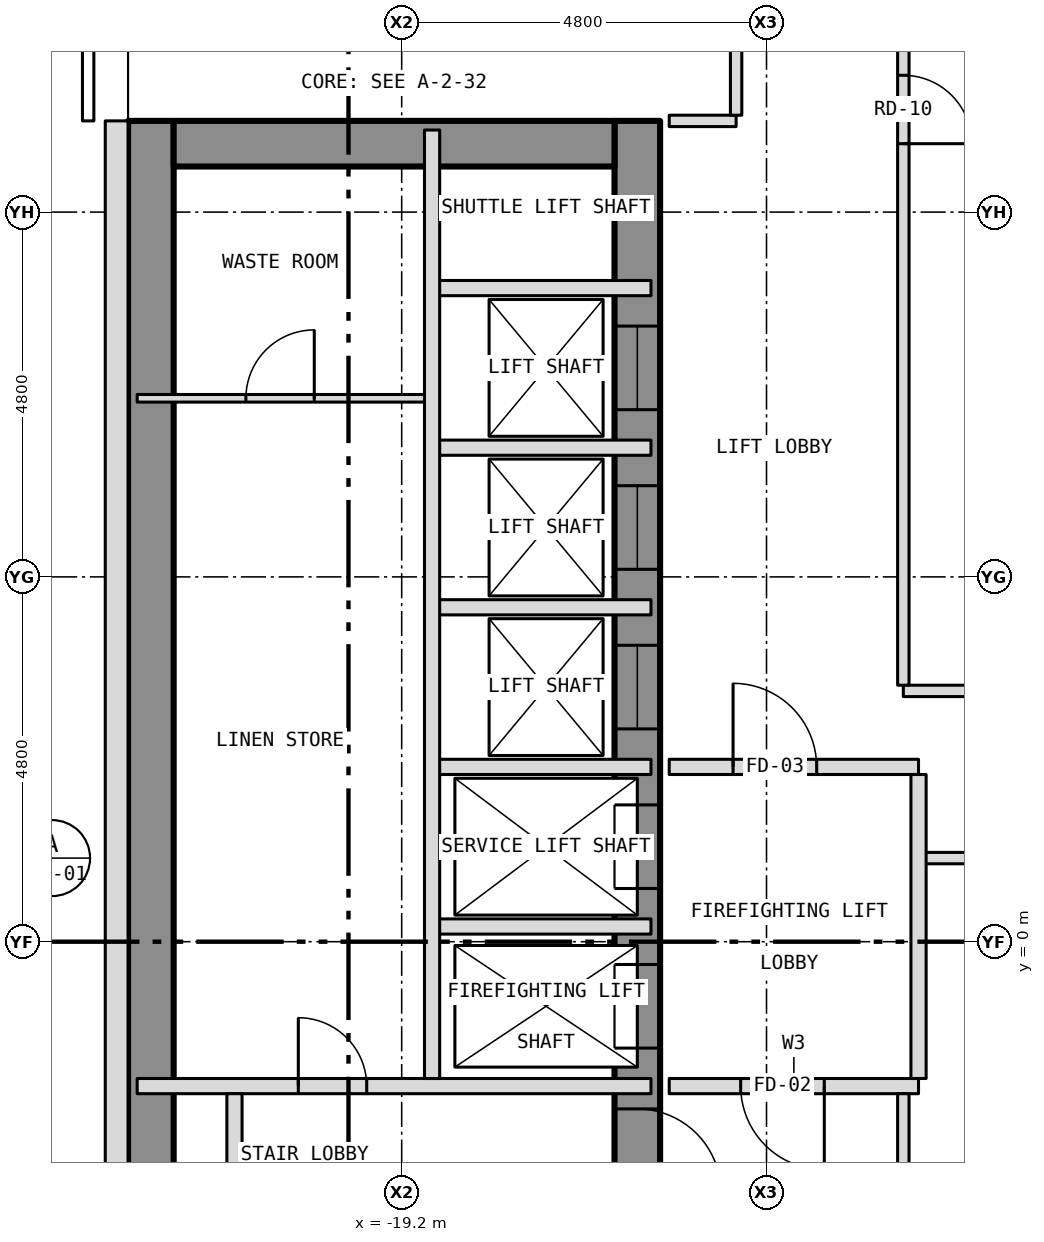
"""IFC4 building model, lengths in metres.
Left out: names, types, materials, properties, quantities, classifications, styles, units other than length and angle.
Written with IfcOpenShell. Run it as: python <this file> out.ifc"""

import sys

from ifc_helpers import new_model, si_unit, direction, frame, frame_2d, origin, place, context, subcontext, project, spatial, rectangle, extrude, element, fill, save


model = new_model("IFC4")
c1 = context("Model", 3, precision=1e-05, world=origin(), true_north=direction((0.0, 1.0)))
c2 = subcontext(c1, "Body", "Model", "MODEL_VIEW")
j1 = project(units=[si_unit("LENGTHUNIT", "METRE"), si_unit("PLANEANGLEUNIT", "RADIAN")], contexts=[c1])
p1 = place(None, origin())
s1 = spatial("IfcSite", under=j1, at=p1, CompositionType="ELEMENT")
p2 = place(p1, origin())
s2 = spatial("IfcBuilding", under=s1, at=p2, CompositionType="ELEMENT")
p3 = place(p2, frame((0.0, 0.0, 117.0)))
s3 = spatial("IfcBuildingStorey", under=s2, at=p3, CompositionType="ELEMENT", Elevation=117.0)
p4 = place(p3, frame((-16.1, -10.8, 0.0), z_axis=(0.0, 0.0, 1.0), x_axis=(0.0, 1.0, 0.0)))
e1 = element("IfcWall", 1, at=p4, inside=s3, PredefinedType="SHEAR", context=c2, shape_type="SweptSolid", body=[
    extrude(rectangle(XDim=21.6, YDim=0.6, at=frame_2d((10.8, 0.0))), origin(), (0.0, 0.0, 1.0), 3.25),
])
p5 = place(p4, frame((9.4, 0.0, 0.0)))
e2 = element("IfcOpeningElement", 2, at=p5, cuts=e1, PredefinedType="OPENING", context=c2, shape_type="SweptSolid", body=[
    extrude(rectangle(XDim=1.1, YDim=2.1, at=frame_2d((0.55, 1.05))), frame((0.0, 0.312, 0.0), z_axis=(0.0, -1.0, 0.0), x_axis=(1.0, 0.0, 0.0)), (0.0, 0.0, 1.0), 0.624),
])
p6 = place(p4, frame((11.5, 0.0, 0.0)))
e3 = element("IfcOpeningElement", 3, at=p6, cuts=e1, PredefinedType="OPENING", context=c2, shape_type="SweptSolid", body=[
    extrude(rectangle(XDim=1.1, YDim=2.1, at=frame_2d((0.55, 1.05))), frame((0.0, 0.312, 0.0), z_axis=(0.0, -1.0, 0.0), x_axis=(1.0, 0.0, 0.0)), (0.0, 0.0, 1.0), 0.624),
])
p7 = place(p4, frame((13.6, 0.0, 0.0)))
e4 = element("IfcOpeningElement", 4, at=p7, cuts=e1, PredefinedType="OPENING", context=c2, shape_type="SweptSolid", body=[
    extrude(rectangle(XDim=1.1, YDim=2.1, at=frame_2d((0.55, 1.05))), frame((0.0, 0.312, 0.0), z_axis=(0.0, -1.0, 0.0), x_axis=(1.0, 0.0, 0.0)), (0.0, 0.0, 1.0), 0.624),
])
p8 = place(p4, frame((15.7, 0.0, 0.0)))
e5 = element("IfcOpeningElement", 5, at=p8, cuts=e1, PredefinedType="OPENING", context=c2, shape_type="SweptSolid", body=[
    extrude(rectangle(XDim=1.1, YDim=2.1, at=frame_2d((0.55, 1.05))), frame((0.0, 0.312, 0.0), z_axis=(0.0, -1.0, 0.0), x_axis=(1.0, 0.0, 0.0)), (0.0, 0.0, 1.0), 0.624),
])
p9 = place(p4, frame((17.8, 0.0, 0.0)))
e6 = element("IfcOpeningElement", 6, at=p9, cuts=e1, PredefinedType="OPENING", context=c2, shape_type="SweptSolid", body=[
    extrude(rectangle(XDim=1.1, YDim=2.1, at=frame_2d((0.55, 1.05))), frame((0.0, 0.312, 0.0), z_axis=(0.0, -1.0, 0.0), x_axis=(1.0, 0.0, 0.0)), (0.0, 0.0, 1.0), 0.624),
])
p10 = place(p4, frame((0.758, 0.0, 0.0)))
e7 = element("IfcOpeningElement", 7, at=p10, cuts=e1, PredefinedType="OPENING", context=c2, shape_type="SweptSolid", body=[
    extrude(rectangle(XDim=1.1, YDim=2.1, at=frame_2d((0.55, 1.05))), frame((0.0, 0.312, 0.0), z_axis=(0.0, -1.0, 0.0), x_axis=(1.0, 0.0, 0.0)), (0.0, 0.0, 1.0), 0.624),
])
p11 = place(p4, frame((7.5, 0.0, 0.0)))
e8 = element("IfcOpeningElement", 8, at=p11, cuts=e1, PredefinedType="OPENING", context=c2, shape_type="SweptSolid", body=[
    extrude(rectangle(XDim=1.1, YDim=2.1, at=frame_2d((0.55, 1.05))), frame((0.0, 0.312, 0.0), z_axis=(0.0, -1.0, 0.0), x_axis=(1.0, 0.0, 0.0)), (0.0, 0.0, 1.0), 0.624),
])
p12 = place(p3, frame((-22.5, -10.8, 0.0), z_axis=(0.0, 0.0, 1.0), x_axis=(0.0, 1.0, 0.0)))
e9 = element("IfcWall", 9, at=p12, inside=s3, PredefinedType="SHEAR", context=c2, shape_type="SweptSolid", body=[
    extrude(rectangle(XDim=21.6, YDim=0.6, at=frame_2d((10.8, 0.0))), origin(), (0.0, 0.0, 1.0), 3.25),
])
p13 = place(p3, frame((-22.2, 10.5, 0.0), z_axis=(0.0, 0.0, 1.0), x_axis=(1.0, 0.0, 0.0)))
e10 = element("IfcWall", 10, at=p13, inside=s3, PredefinedType="SHEAR", context=c2, shape_type="SweptSolid", body=[
    extrude(rectangle(XDim=5.8, YDim=0.6, at=frame_2d((2.9, 0.0))), origin(), (0.0, 0.0, 1.0), 3.25),
])
p14 = place(p3, frame((-22.95, 10.8, 0.0), z_axis=(0.0, 0.0, 1.0), x_axis=(0.0, -1.0, 0.0)))
e11 = element("IfcWall", 11, at=p14, inside=s3, PredefinedType="SOLIDWALL", context=c2, shape_type="SweptSolid", body=[
    extrude(rectangle(XDim=21.6, YDim=0.3, at=frame_2d((10.8, 0.0))), origin(), (0.0, 0.0, 1.0), 3.5),
])
p15 = place(p14, frame((18.05, 0.0, 1.0)))
e12 = element("IfcOpeningElement", 12, at=p15, cuts=e11, PredefinedType="OPENING", context=c2, shape_type="SweptSolid", body=[
    extrude(rectangle(XDim=0.6, YDim=1.5, at=frame_2d((0.3, 0.75))), frame((0.0, 0.162, 0.0), z_axis=(0.0, -1.0, 0.0), x_axis=(1.0, 0.0, 0.0)), (0.0, 0.0, 1.0), 0.324),
])
p16 = place(p3, frame((-22.68, -1.9, 0.0), z_axis=(0.0, 0.0, 1.0), x_axis=(1.0, 0.0, 0.0)))
e13 = element("IfcWall", 13, at=p16, inside=s3, PredefinedType="PARTITIONING", context=c2, shape_type="SweptSolid", body=[
    extrude(rectangle(XDim=6.76, YDim=0.2, at=frame_2d((3.38, 0.0))), origin(), (0.0, 0.0, 1.0), 3.25),
])
p17 = place(p16, frame((2.12, 0.0, 0.0)))
e14 = element("IfcOpeningElement", 14, at=p17, cuts=e13, PredefinedType="OPENING", context=c2, shape_type="SweptSolid", body=[
    extrude(rectangle(XDim=0.9, YDim=2.1, at=frame_2d((0.45, 1.05))), frame((0.0, 0.112, 0.0), z_axis=(0.0, -1.0, 0.0), x_axis=(1.0, 0.0, 0.0)), (0.0, 0.0, 1.0), 0.224),
])
p18 = place(p3, frame((-15.68, -1.9, 0.0), z_axis=(0.0, 0.0, 1.0), x_axis=(1.0, 0.0, 0.0)))
e15 = element("IfcWall", 15, at=p18, inside=s3, PredefinedType="PARTITIONING", context=c2, shape_type="SweptSolid", body=[
    extrude(rectangle(XDim=3.28, YDim=0.2, at=frame_2d((1.64, 0.0))), origin(), (0.0, 0.0, 1.0), 3.35),
])
p19 = place(p18, frame((0.94, 0.0, 0.0)))
e16 = element("IfcOpeningElement", 16, at=p19, cuts=e15, PredefinedType="OPENING", context=c2, shape_type="SweptSolid", body=[
    extrude(rectangle(XDim=1.1, YDim=2.1, at=frame_2d((0.55, 1.05))), frame((0.0, 0.112, 0.0), z_axis=(0.0, -1.0, 0.0), x_axis=(1.0, 0.0, 0.0)), (0.0, 0.0, 1.0), 0.224),
])
p20 = place(p3, frame((-18.8, 0.2, 0.0), z_axis=(0.0, 0.0, 1.0), x_axis=(1.0, 0.0, 0.0)))
e17 = element("IfcWall", 17, at=p20, inside=s3, PredefinedType="PARTITIONING", context=c2, shape_type="SweptSolid", body=[
    extrude(rectangle(XDim=2.88, YDim=0.2, at=frame_2d((1.44, 0.0))), origin(), (0.0, 0.0, 1.0), 3.25),
])
p21 = place(p3, frame((-12.4, 1.1, 0.0), z_axis=(0.0, 0.0, 1.0), x_axis=(1.0, 0.0, 0.0)))
e18 = element("IfcWall", 18, at=p21, inside=s3, PredefinedType="PARTITIONING", context=c2, shape_type="SweptSolid", body=[
    extrude(rectangle(XDim=2.964, YDim=0.15, at=frame_2d((1.482, 0.0))), origin(), (0.0, 0.0, 1.0), 3.35),
])
p22 = place(p3, frame((-18.8, 2.3, 0.0), z_axis=(0.0, 0.0, 1.0), x_axis=(1.0, 0.0, 0.0)))
e19 = element("IfcWall", 19, at=p22, inside=s3, PredefinedType="PARTITIONING", context=c2, shape_type="SweptSolid", body=[
    extrude(rectangle(XDim=2.88, YDim=0.2, at=frame_2d((1.44, 0.0))), origin(), (0.0, 0.0, 1.0), 3.25),
])
p23 = place(p3, frame((-15.68, 2.3, 0.0), z_axis=(0.0, 0.0, 1.0), x_axis=(1.0, 0.0, 0.0)))
e20 = element("IfcWall", 20, at=p23, inside=s3, PredefinedType="PARTITIONING", context=c2, shape_type="SweptSolid", body=[
    extrude(rectangle(XDim=3.28, YDim=0.2, at=frame_2d((1.64, 0.0))), origin(), (0.0, 0.0, 1.0), 3.35),
])
p24 = place(p23, frame((0.84, 0.0, 0.0)))
e21 = element("IfcOpeningElement", 21, at=p24, cuts=e20, PredefinedType="OPENING", context=c2, shape_type="SweptSolid", body=[
    extrude(rectangle(XDim=1.1, YDim=2.1, at=frame_2d((0.55, 1.05))), frame((0.0, 0.112, 0.0), z_axis=(0.0, -1.0, 0.0), x_axis=(1.0, 0.0, 0.0)), (0.0, 0.0, 1.0), 0.224),
])
p25 = place(p3, frame((-12.6, 3.3, 0.0), z_axis=(0.0, 0.0, 1.0), x_axis=(1.0, 0.0, 0.0)))
e22 = element("IfcWall", 22, at=p25, inside=s3, PredefinedType="PARTITIONING", context=c2, shape_type="SweptSolid", body=[
    extrude(rectangle(XDim=4.68, YDim=0.15, at=frame_2d((2.34, 0.0))), origin(), (0.0, 0.0, 1.0), 3.35),
])
for number, where, z_axis, x_axis in (
    (23, (-18.8, 4.4, 0.0), (0.0, 0.0, 1.0), (1.0, 0.0, 0.0)),
    (24, (-18.8, 6.5, 0.0), (0.0, 0.0, 1.0), (1.0, 0.0, 0.0)),
):
    element("IfcWall", number, at=place(p3, frame(where, z_axis=z_axis, x_axis=x_axis)), inside=s3, PredefinedType="PARTITIONING", context=c2, shape_type="SweptSolid", body=[
        extrude(rectangle(XDim=2.88, YDim=0.2, at=frame_2d((1.44, 0.0))), origin(), (0.0, 0.0, 1.0), 3.25),
    ])
p26 = place(p3, frame((-22.68, 7.15, 0.0), z_axis=(0.0, 0.0, 1.0), x_axis=(1.0, 0.0, 0.0)))
e25 = element("IfcWall", 25, at=p26, inside=s3, PredefinedType="PARTITIONING", context=c2, shape_type="SweptSolid", body=[
    extrude(rectangle(XDim=3.88, YDim=0.1, at=frame_2d((1.94, 0.0))), origin(), (0.0, 0.0, 1.0), 3.25),
])
p27 = place(p26, frame((1.43, 0.0, 0.0)))
e26 = element("IfcOpeningElement", 26, at=p27, cuts=e25, PredefinedType="OPENING", context=c2, shape_type="SweptSolid", body=[
    extrude(rectangle(XDim=0.9, YDim=2.1, at=frame_2d((0.45, 1.05))), frame((0.0, 0.062, 0.0), z_axis=(0.0, -1.0, 0.0), x_axis=(1.0, 0.0, 0.0)), (0.0, 0.0, 1.0), 0.124),
])
p28 = place(p3, frame((-18.8, 8.6, 0.0), z_axis=(0.0, 0.0, 1.0), x_axis=(1.0, 0.0, 0.0)))
e27 = element("IfcWall", 27, at=p28, inside=s3, PredefinedType="PARTITIONING", context=c2, shape_type="SweptSolid", body=[
    extrude(rectangle(XDim=2.88, YDim=0.2, at=frame_2d((1.44, 0.0))), origin(), (0.0, 0.0, 1.0), 3.25),
])
p29 = place(p3, frame((-15.68, 10.8, 0.0), z_axis=(0.0, 0.0, 1.0), x_axis=(1.0, 0.0, 0.0)))
e28 = element("IfcWall", 28, at=p29, inside=s3, PredefinedType="PARTITIONING", context=c2, shape_type="SweptSolid", body=[
    extrude(rectangle(XDim=0.88, YDim=0.15, at=frame_2d((0.44, 0.0))), origin(), (0.0, 0.0, 1.0), 3.35),
])
p30 = place(p3, frame((-21.4, -10.68, 0.0), z_axis=(0.0, 0.0, 1.0), x_axis=(0.0, 1.0, 0.0)))
e29 = element("IfcWall", 29, at=p30, inside=s3, PredefinedType="PARTITIONING", context=c2, shape_type="SweptSolid", body=[
    extrude(rectangle(XDim=8.68, YDim=0.2, at=frame_2d((4.34, 0.0))), origin(), (0.0, 0.0, 1.0), 3.25),
])
p31 = place(p30, frame((1.21, 0.0, 0.0)))
e30 = element("IfcOpeningElement", 30, at=p31, cuts=e29, PredefinedType="OPENING", context=c2, shape_type="SweptSolid", body=[
    extrude(rectangle(XDim=0.9, YDim=2.1, at=frame_2d((0.45, 1.05))), frame((0.0, 0.112, 0.0), z_axis=(0.0, -1.0, 0.0), x_axis=(1.0, 0.0, 0.0)), (0.0, 0.0, 1.0), 0.224),
])
p32 = place(p30, frame((5.66, 0.0, 0.0)))
e31 = element("IfcOpeningElement", 31, at=p32, cuts=e29, PredefinedType="OPENING", context=c2, shape_type="SweptSolid", body=[
    extrude(rectangle(XDim=0.9, YDim=2.1, at=frame_2d((0.45, 1.05))), frame((0.0, 0.112, 0.0), z_axis=(0.0, -1.0, 0.0), x_axis=(1.0, 0.0, 0.0)), (0.0, 0.0, 1.0), 0.224),
])
p33 = place(p3, frame((-18.8, -1.8, 0.0), z_axis=(0.0, 0.0, 1.0), x_axis=(0.0, 1.0, 0.0)))
e32 = element("IfcWall", 32, at=p33, inside=s3, PredefinedType="PARTITIONING", context=c2, shape_type="SweptSolid", body=[
    extrude(rectangle(XDim=12.48, YDim=0.2, at=frame_2d((6.24, 0.0))), origin(), (0.0, 0.0, 1.0), 3.25),
])
p34 = place(p3, frame((-14.8, 10.875, 0.0), z_axis=(0.0, 0.0, 1.0), x_axis=(0.0, 1.0, 0.0)))
e33 = element("IfcWall", 33, at=p34, inside=s3, PredefinedType="PARTITIONING", context=c2, shape_type="SweptSolid", body=[
    extrude(rectangle(XDim=3.85, YDim=0.15, at=frame_2d((1.925, 0.0))), origin(), (0.0, 0.0, 1.0), 3.35),
])
p35 = place(p34, frame((2.325, 0.0, 0.0)))
e34 = element("IfcOpeningElement", 34, at=p35, cuts=e33, PredefinedType="OPENING", context=c2, shape_type="SweptSolid", body=[
    extrude(rectangle(XDim=1.0, YDim=2.1, at=frame_2d((0.5, 1.05))), frame((0.0, 0.087, 0.0), z_axis=(0.0, -1.0, 0.0), x_axis=(1.0, 0.0, 0.0)), (0.0, 0.0, 1.0), 0.174),
])
p36 = place(p3, frame((-12.6, -12.525, 0.0), z_axis=(0.0, 0.0, 1.0), x_axis=(0.0, 1.0, 0.0)))
e35 = element("IfcWall", 35, at=p36, inside=s3, PredefinedType="PARTITIONING", context=c2, shape_type="SweptSolid", body=[
    extrude(rectangle(XDim=10.525, YDim=0.15, at=frame_2d((5.262, 0.0))), origin(), (0.0, 0.0, 1.0), 3.35),
])
p37 = place(p36, frame((4.825, 0.0, 0.0)))
e36 = element("IfcOpeningElement", 36, at=p37, cuts=e35, PredefinedType="OPENING", context=c2, shape_type="SweptSolid", body=[
    extrude(rectangle(XDim=0.9, YDim=2.1, at=frame_2d((0.45, 1.05))), frame((0.0, 0.087, 0.0), z_axis=(0.0, -1.0, 0.0), x_axis=(1.0, 0.0, 0.0)), (0.0, 0.0, 1.0), 0.174),
])
p38 = place(p3, frame((-12.6, 3.375, 0.0), z_axis=(0.0, 0.0, 1.0), x_axis=(0.0, 1.0, 0.0)))
e37 = element("IfcWall", 37, at=p38, inside=s3, PredefinedType="PARTITIONING", context=c2, shape_type="SweptSolid", body=[
    extrude(rectangle(XDim=9.15, YDim=0.15, at=frame_2d((4.575, 0.0))), origin(), (0.0, 0.0, 1.0), 3.35),
])
p39 = place(p38, frame((7.125, 0.0, 0.0)))
e38 = element("IfcOpeningElement", 38, at=p39, cuts=e37, PredefinedType="OPENING", context=c2, shape_type="SweptSolid", body=[
    extrude(rectangle(XDim=0.9, YDim=2.1, at=frame_2d((0.45, 1.05))), frame((0.0, 0.087, 0.0), z_axis=(0.0, -1.0, 0.0), x_axis=(1.0, 0.0, 0.0)), (0.0, 0.0, 1.0), 0.174),
])
p40 = place(p3, frame((-12.4, -1.8, 0.0), z_axis=(0.0, 0.0, 1.0), x_axis=(0.0, 1.0, 0.0)))
e39 = element("IfcWall", 39, at=p40, inside=s3, PredefinedType="PARTITIONING", context=c2, shape_type="SweptSolid", body=[
    extrude(rectangle(XDim=4.0, YDim=0.2, at=frame_2d((2.0, 0.0))), origin(), (0.0, 0.0, 1.0), 3.35),
])
p41 = place(p5, origin())
e40 = element("IfcDoor", 40, at=p41, inside=s3, OperationType="SLIDING_TO_LEFT", PredefinedType="DOOR", context=c2, shape_type="SweptSolid", body=[
    extrude(rectangle(XDim=1.1, YDim=2.1, at=frame_2d((0.55, 1.05))), frame((0.0, 0.025, 0.0), z_axis=(0.0, -1.0, 0.0), x_axis=(1.0, 0.0, 0.0)), (0.0, 0.0, 1.0), 0.05),
])
fill(e2, e40)
p42 = place(p6, origin())
e41 = element("IfcDoor", 41, at=p42, inside=s3, OperationType="SLIDING_TO_LEFT", PredefinedType="DOOR", context=c2, shape_type="SweptSolid", body=[
    extrude(rectangle(XDim=1.1, YDim=2.1, at=frame_2d((0.55, 1.05))), frame((0.0, 0.025, 0.0), z_axis=(0.0, -1.0, 0.0), x_axis=(1.0, 0.0, 0.0)), (0.0, 0.0, 1.0), 0.05),
])
fill(e3, e41)
p43 = place(p7, origin())
e42 = element("IfcDoor", 42, at=p43, inside=s3, OperationType="SLIDING_TO_LEFT", PredefinedType="DOOR", context=c2, shape_type="SweptSolid", body=[
    extrude(rectangle(XDim=1.1, YDim=2.1, at=frame_2d((0.55, 1.05))), frame((0.0, 0.025, 0.0), z_axis=(0.0, -1.0, 0.0), x_axis=(1.0, 0.0, 0.0)), (0.0, 0.0, 1.0), 0.05),
])
fill(e4, e42)
p44 = place(p8, origin())
e43 = element("IfcDoor", 43, at=p44, inside=s3, OperationType="SLIDING_TO_LEFT", PredefinedType="DOOR", context=c2, shape_type="SweptSolid", body=[
    extrude(rectangle(XDim=1.1, YDim=2.1, at=frame_2d((0.55, 1.05))), frame((0.0, 0.025, 0.0), z_axis=(0.0, -1.0, 0.0), x_axis=(1.0, 0.0, 0.0)), (0.0, 0.0, 1.0), 0.05),
])
fill(e5, e43)
p45 = place(p9, origin())
e44 = element("IfcDoor", 44, at=p45, inside=s3, OperationType="SLIDING_TO_LEFT", PredefinedType="DOOR", context=c2, shape_type="SweptSolid", body=[
    extrude(rectangle(XDim=1.1, YDim=2.1, at=frame_2d((0.55, 1.05))), frame((0.0, 0.025, 0.0), z_axis=(0.0, -1.0, 0.0), x_axis=(1.0, 0.0, 0.0)), (0.0, 0.0, 1.0), 0.05),
])
fill(e6, e44)
p46 = place(p11, origin())
e45 = element("IfcDoor", 45, at=p46, inside=s3, OperationType="SINGLE_SWING_LEFT", PredefinedType="DOOR", context=c2, shape_type="SweptSolid", body=[
    extrude(rectangle(XDim=1.1, YDim=2.1, at=frame_2d((0.55, 1.05))), frame((0.0, 0.025, 0.0), z_axis=(0.0, -1.0, 0.0), x_axis=(1.0, 0.0, 0.0)), (0.0, 0.0, 1.0), 0.05),
])
fill(e8, e45)
p47 = place(p17, origin())
e46 = element("IfcDoor", 46, at=p47, inside=s3, OperationType="SINGLE_SWING_LEFT", PredefinedType="DOOR", context=c2, shape_type="SweptSolid", body=[
    extrude(rectangle(XDim=0.9, YDim=2.1, at=frame_2d((0.45, 1.05))), frame((0.0, 0.025, 0.0), z_axis=(0.0, -1.0, 0.0), x_axis=(1.0, 0.0, 0.0)), (0.0, 0.0, 1.0), 0.05),
])
fill(e14, e46)
p48 = place(p27, origin())
e47 = element("IfcDoor", 47, at=p48, inside=s3, OperationType="SINGLE_SWING_RIGHT", PredefinedType="DOOR", context=c2, shape_type="SweptSolid", body=[
    extrude(rectangle(XDim=0.9, YDim=2.1, at=frame_2d((0.45, 1.05))), frame((0.0, 0.025, 0.0), z_axis=(0.0, -1.0, 0.0), x_axis=(1.0, 0.0, 0.0)), (0.0, 0.0, 1.0), 0.05),
])
fill(e26, e47)
p49 = place(p19, origin())
e48 = element("IfcDoor", 48, at=p49, inside=s3, OperationType="SINGLE_SWING_RIGHT", PredefinedType="DOOR", context=c2, shape_type="SweptSolid", body=[
    extrude(rectangle(XDim=1.1, YDim=2.1, at=frame_2d((0.55, 1.05))), frame((0.0, 0.025, 0.0), z_axis=(0.0, -1.0, 0.0), x_axis=(1.0, 0.0, 0.0)), (0.0, 0.0, 1.0), 0.05),
])
fill(e16, e48)
p50 = place(p24, origin())
e49 = element("IfcDoor", 49, at=p50, inside=s3, OperationType="SINGLE_SWING_LEFT", PredefinedType="DOOR", context=c2, shape_type="SweptSolid", body=[
    extrude(rectangle(XDim=1.1, YDim=2.1, at=frame_2d((0.55, 1.05))), frame((0.0, 0.025, 0.0), z_axis=(0.0, -1.0, 0.0), x_axis=(1.0, 0.0, 0.0)), (0.0, 0.0, 1.0), 0.05),
])
fill(e21, e49)
p51 = place(p39, origin())
e50 = element("IfcDoor", 50, at=p51, inside=s3, OperationType="SINGLE_SWING_LEFT", PredefinedType="DOOR", context=c2, shape_type="SweptSolid", body=[
    extrude(rectangle(XDim=0.9, YDim=2.1, at=frame_2d((0.45, 1.05))), frame((0.0, 0.025, 0.0), z_axis=(0.0, -1.0, 0.0), x_axis=(1.0, 0.0, 0.0)), (0.0, 0.0, 1.0), 0.05),
])
fill(e38, e50)
save(model, sys.argv[1])
